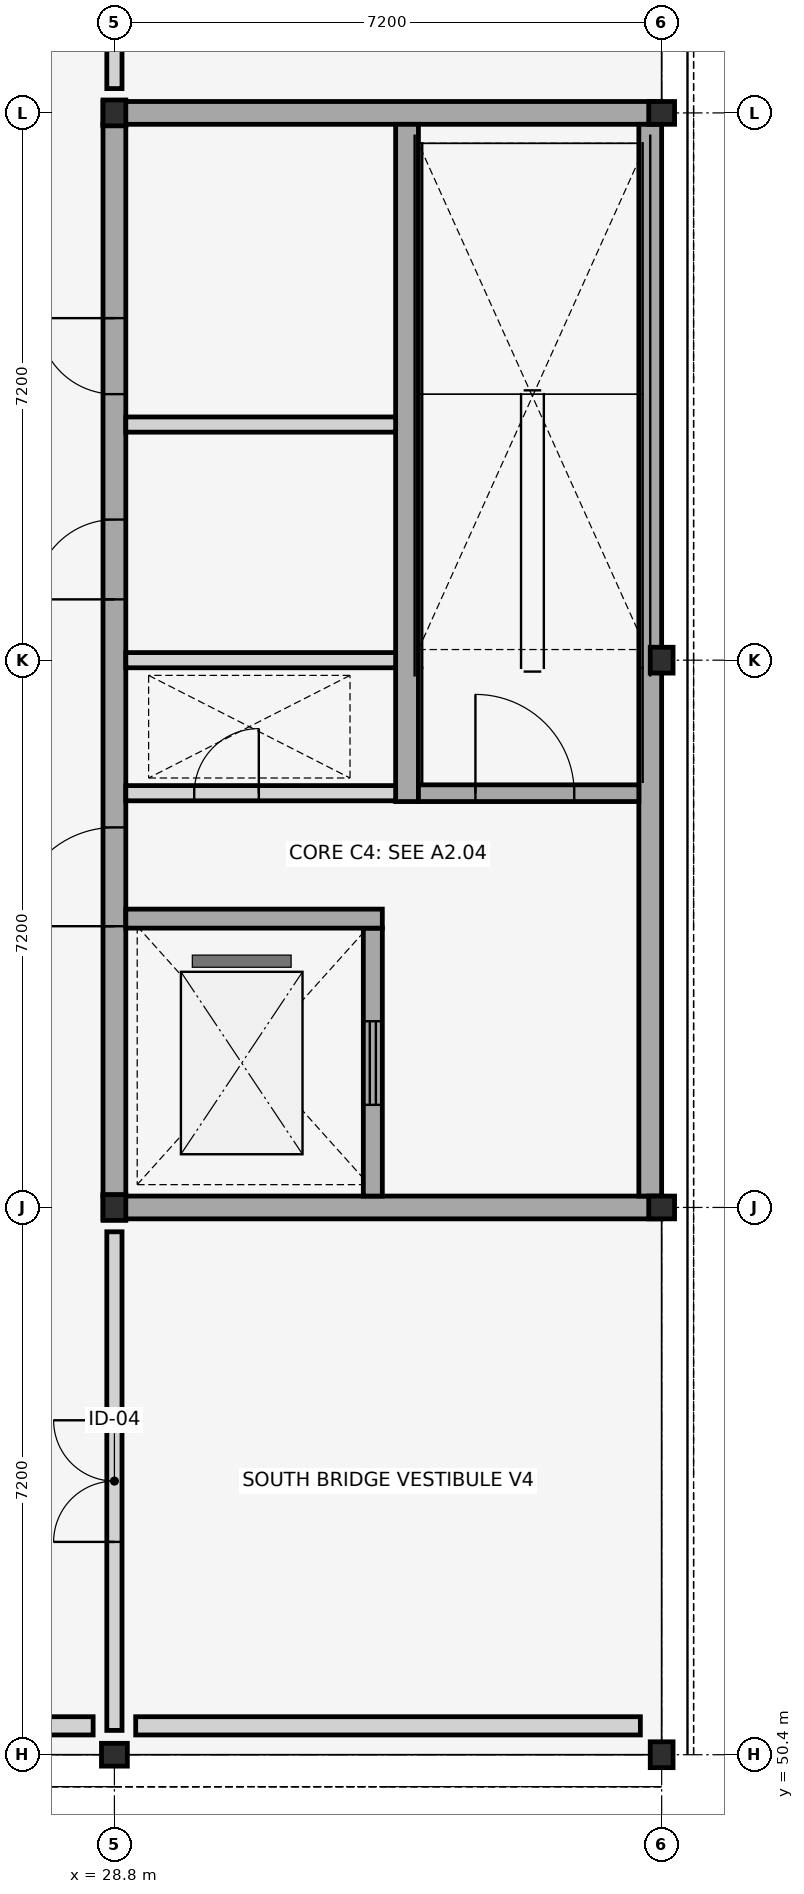
"""IFC4 building model, lengths in metres.
Left out: names, types, materials, properties, quantities, classifications, styles, units other than length and angle.
Written with IfcOpenShell. Run it as: python <this file> out.ifc"""

import sys

from ifc_helpers import new_model, si_unit, direction, frame, frame_2d, origin, origin_2d, place, context, subcontext, project, spatial, rectangle, i_section, extrude, element, fill, save


model = new_model("IFC4")
c1 = context("Model", 3, precision=1e-05, world=origin(), true_north=direction((0.0, 1.0)))
c2 = subcontext(c1, "Body", "Model", "MODEL_VIEW")
j1 = project(units=[si_unit("LENGTHUNIT", "METRE"), si_unit("PLANEANGLEUNIT", "RADIAN")], contexts=[c1])
p1 = place(None, origin())
s1 = spatial("IfcSite", under=j1, at=p1, CompositionType="ELEMENT")
p2 = place(p1, origin())
s2 = spatial("IfcBuilding", under=s1, at=p2, CompositionType="ELEMENT")
p3 = place(p2, frame((0.0, 0.0, 4.5)))
s3 = spatial("IfcBuildingStorey", under=s2, at=p3, CompositionType="ELEMENT", Elevation=4.5)
for number, where, z_axis, x_axis in (
    (1, (28.8, 50.4, 0.0), (0.0, 0.0, 1.0), (0.0, 1.0, 0.0)),
    (2, (28.8, 57.6, 0.0), (0.0, 0.0, 1.0), (1.0, 0.0, 0.0)),
    (3, (28.8, 72.0, 0.0), (0.0, 0.0, 1.0), (1.0, 0.0, 0.0)),
    (4, (36.0, 50.4, 0.0), (0.0, 0.0, 1.0), (1.0, 0.0, 0.0)),
    (5, (36.0, 57.6, 0.0), (0.0, 0.0, 1.0), (0.0, 1.0, 0.0)),
    (6, (36.0, 64.8, 0.0), (0.0, 0.0, 1.0), (1.0, 0.0, 0.0)),
    (7, (36.0, 72.0, 0.0), (0.0, 0.0, 1.0), (0.0, 1.0, 0.0)),
):
    element("IfcColumn", number, at=place(p3, frame(where, z_axis=z_axis, x_axis=x_axis)), inside=s3, PredefinedType="COLUMN", context=c2, shape_type="SweptSolid", body=[
        extrude(i_section(OverallWidth=0.3, OverallDepth=0.34, WebThickness=0.012, FlangeThickness=0.021, FilletRadius=0.027, at=origin_2d()), origin(), (0.0, 0.0, 1.0), 4.2),
    ])
p4 = place(p3, frame((21.88, 50.78, 0.0), z_axis=(0.0, 0.0, 1.0), x_axis=(1.0, 0.0, 0.0)))
e8 = element("IfcWall", 8, at=p4, inside=s3, PredefinedType="STANDARD", context=c2, shape_type="SweptSolid", body=[
    extrude(rectangle(XDim=6.64, YDim=0.24, at=frame_2d((3.32, 0.0))), origin(), (0.0, 0.0, 1.0), 3.58),
])
p5 = place(p3, frame((29.08, 50.78, 0.0), z_axis=(0.0, 0.0, 1.0), x_axis=(1.0, 0.0, 0.0)))
e9 = element("IfcWall", 9, at=p5, inside=s3, PredefinedType="STANDARD", context=c2, shape_type="SweptSolid", body=[
    extrude(rectangle(XDim=6.64, YDim=0.24, at=frame_2d((3.32, 0.0))), origin(), (0.0, 0.0, 1.0), 3.58),
])
for number, where, z_axis, x_axis in (
    (10, (28.65, 57.6, 0.0), (0.0, 0.0, 1.0), (1.0, 0.0, 0.0)),
    (11, (28.65, 72.0, 0.0), (0.0, 0.0, 1.0), (1.0, 0.0, 0.0)),
):
    element("IfcWall", number, at=place(p3, frame(where, z_axis=z_axis, x_axis=x_axis)), inside=s3, PredefinedType="SHEAR", context=c2, shape_type="SweptSolid", body=[
        extrude(rectangle(XDim=7.35, YDim=0.3, at=frame_2d((3.675, 0.0))), origin(), (0.0, 0.0, 1.0), 3.98),
    ])
p6 = place(p3, frame((35.85, 57.75, 0.0), z_axis=(0.0, 0.0, 1.0), x_axis=(0.0, 1.0, 0.0)))
e12 = element("IfcWall", 12, at=p6, inside=s3, PredefinedType="SHEAR", context=c2, shape_type="SweptSolid", body=[
    extrude(rectangle(XDim=14.1, YDim=0.3, at=frame_2d((7.05, 0.0))), origin(), (0.0, 0.0, 1.0), 3.98),
])
p7 = place(p3, frame((28.8, 57.75, 0.0), z_axis=(0.0, 0.0, 1.0), x_axis=(0.0, 1.0, 0.0)))
e13 = element("IfcWall", 13, at=p7, inside=s3, PredefinedType="SHEAR", context=c2, shape_type="SweptSolid", body=[
    extrude(rectangle(XDim=14.1, YDim=0.3, at=frame_2d((7.05, 0.0))), origin(), (0.0, 0.0, 1.0), 3.98),
])
p8 = place(p7, frame((3.55, 0.0, 0.0)))
e14 = element("IfcOpeningElement", 14, at=p8, cuts=e13, PredefinedType="OPENING", context=c2, shape_type="SweptSolid", body=[
    extrude(rectangle(XDim=1.3, YDim=2.2, at=frame_2d((0.65, 1.1))), frame((0.0, 0.16, 0.0), z_axis=(0.0, -1.0, 0.0), x_axis=(1.0, 0.0, 0.0)), (0.0, 0.0, 1.0), 0.32),
])
p9 = place(p7, frame((7.85, 0.0, 0.0)))
e15 = element("IfcOpeningElement", 15, at=p9, cuts=e13, PredefinedType="OPENING", context=c2, shape_type="SweptSolid", body=[
    extrude(rectangle(XDim=1.05, YDim=2.15, at=frame_2d((0.525, 1.075))), frame((0.0, 0.16, 0.0), z_axis=(0.0, -1.0, 0.0), x_axis=(1.0, 0.0, 0.0)), (0.0, 0.0, 1.0), 0.32),
])
p10 = place(p7, frame((10.55, 0.0, 0.0)))
e16 = element("IfcOpeningElement", 16, at=p10, cuts=e13, PredefinedType="OPENING", context=c2, shape_type="SweptSolid", body=[
    extrude(rectangle(XDim=1.0, YDim=2.15, at=frame_2d((0.5, 1.075))), frame((0.0, 0.16, 0.0), z_axis=(0.0, -1.0, 0.0), x_axis=(1.0, 0.0, 0.0)), (0.0, 0.0, 1.0), 0.32),
])
p11 = place(p3, frame((32.2, 57.75, 0.0), z_axis=(0.0, 0.0, 1.0), x_axis=(0.0, 1.0, 0.0)))
e17 = element("IfcWall", 17, at=p11, inside=s3, PredefinedType="SHEAR", context=c2, shape_type="SweptSolid", body=[
    extrude(rectangle(XDim=3.525, YDim=0.25, at=frame_2d((1.762, 0.0))), origin(), (0.0, 0.0, 1.0), 3.98),
])
p12 = place(p11, frame((1.2, 0.0, 0.0)))
e18 = element("IfcOpeningElement", 18, at=p12, cuts=e17, PredefinedType="OPENING", context=c2, shape_type="SweptSolid", body=[
    extrude(rectangle(XDim=1.1, YDim=2.15, at=frame_2d((0.55, 1.075))), frame((0.0, 0.135, 0.0), z_axis=(0.0, -1.0, 0.0), x_axis=(1.0, 0.0, 0.0)), (0.0, 0.0, 1.0), 0.27),
])
p13 = place(p3, frame((32.65, 62.94, 0.0), z_axis=(0.0, 0.0, 1.0), x_axis=(0.0, 1.0, 0.0)))
e19 = element("IfcWall", 19, at=p13, inside=s3, PredefinedType="SHEAR", context=c2, shape_type="SweptSolid", body=[
    extrude(rectangle(XDim=8.91, YDim=0.3, at=frame_2d((4.455, 0.0))), origin(), (0.0, 0.0, 1.0), 3.98),
])
p14 = place(p3, frame((28.95, 63.05, 0.0), z_axis=(0.0, 0.0, 1.0), x_axis=(1.0, 0.0, 0.0)))
e20 = element("IfcWall", 20, at=p14, inside=s3, PredefinedType="PLUMBINGWALL", context=c2, shape_type="SweptSolid", body=[
    extrude(rectangle(XDim=3.55, YDim=0.2, at=frame_2d((1.775, 0.0))), origin(), (0.0, 0.0, 1.0), 3.4),
])
p15 = place(p14, frame((0.9, 0.0, 0.0)))
e21 = element("IfcOpeningElement", 21, at=p15, cuts=e20, PredefinedType="OPENING", context=c2, shape_type="SweptSolid", body=[
    extrude(rectangle(XDim=0.85, YDim=2.05, at=frame_2d((0.425, 1.025))), frame((0.0, 0.11, 0.0), z_axis=(0.0, -1.0, 0.0), x_axis=(1.0, 0.0, 0.0)), (0.0, 0.0, 1.0), 0.22),
])
p16 = place(p3, frame((32.8, 63.05, 0.0), z_axis=(0.0, 0.0, 1.0), x_axis=(1.0, 0.0, 0.0)))
e22 = element("IfcWall", 22, at=p16, inside=s3, PredefinedType="SHEAR", context=c2, shape_type="SweptSolid", body=[
    extrude(rectangle(XDim=2.9, YDim=0.22, at=frame_2d((1.45, 0.0))), origin(), (0.0, 0.0, 1.0), 3.98),
])
p17 = place(p16, frame((0.75, 0.0, 0.0)))
e23 = element("IfcOpeningElement", 23, at=p17, cuts=e22, PredefinedType="OPENING", context=c2, shape_type="SweptSolid", body=[
    extrude(rectangle(XDim=1.3, YDim=2.2, at=frame_2d((0.65, 1.1))), frame((0.0, 0.12, 0.0), z_axis=(0.0, -1.0, 0.0), x_axis=(1.0, 0.0, 0.0)), (0.0, 0.0, 1.0), 0.24),
])
p18 = place(p3, frame((28.95, 61.4, 0.0), z_axis=(0.0, 0.0, 1.0), x_axis=(1.0, 0.0, 0.0)))
e24 = element("IfcWall", 24, at=p18, inside=s3, PredefinedType="SHEAR", context=c2, shape_type="SweptSolid", body=[
    extrude(rectangle(XDim=3.375, YDim=0.25, at=frame_2d((1.688, 0.0))), origin(), (0.0, 0.0, 1.0), 3.98),
])
for number, where, z_axis, x_axis in (
    (25, (28.95, 64.8, 0.0), (0.0, 0.0, 1.0), (1.0, 0.0, 0.0)),
    (26, (28.95, 67.9, 0.0), (0.0, 0.0, 1.0), (1.0, 0.0, 0.0)),
):
    element("IfcWall", number, at=place(p3, frame(where, z_axis=z_axis, x_axis=x_axis)), inside=s3, PredefinedType="PLUMBINGWALL", context=c2, shape_type="SweptSolid", body=[
        extrude(rectangle(XDim=3.55, YDim=0.2, at=frame_2d((1.775, 0.0))), origin(), (0.0, 0.0, 1.0), 3.4),
    ])
p19 = place(p3, frame((28.8, 72.32, 0.0), z_axis=(0.0, 0.0, 1.0), x_axis=(0.0, 1.0, 0.0)))
e27 = element("IfcWall", 27, at=p19, inside=s3, PredefinedType="PARTITIONING", context=c2, shape_type="SweptSolid", body=[
    extrude(rectangle(XDim=20.96, YDim=0.2, at=frame_2d((10.48, 0.0))), origin(), (0.0, 0.0, 1.0), 3.15),
])
p20 = place(p19, frame((9.68, 0.0, 0.0)))
e28 = element("IfcOpeningElement", 28, at=p20, cuts=e27, PredefinedType="OPENING", context=c2, shape_type="SweptSolid", body=[
    extrude(rectangle(XDim=1.6, YDim=2.35, at=frame_2d((0.8, 1.175))), frame((0.0, 0.11, 0.0), z_axis=(0.0, -1.0, 0.0), x_axis=(1.0, 0.0, 0.0)), (0.0, 0.0, 1.0), 0.22),
])
p21 = place(p3, frame((28.8, 50.72, 0.0), z_axis=(0.0, 0.0, 1.0), x_axis=(0.0, 1.0, 0.0)))
e29 = element("IfcWall", 29, at=p21, inside=s3, PredefinedType="PARTITIONING", context=c2, shape_type="SweptSolid", body=[
    extrude(rectangle(XDim=6.56, YDim=0.2, at=frame_2d((3.28, 0.0))), origin(), (0.0, 0.0, 1.0), 3.15),
])
p22 = place(p21, frame((2.48, 0.0, 0.0)))
e30 = element("IfcOpeningElement", 30, at=p22, cuts=e29, PredefinedType="OPENING", context=c2, shape_type="SweptSolid", body=[
    extrude(rectangle(XDim=1.6, YDim=2.35, at=frame_2d((0.8, 1.175))), frame((0.0, 0.11, 0.0), z_axis=(0.0, -1.0, 0.0), x_axis=(1.0, 0.0, 0.0)), (0.0, 0.0, 1.0), 0.22),
])
p23 = place(p8, origin())
e31 = element("IfcDoor", 31, at=p23, inside=s3, OperationType="SINGLE_SWING_LEFT", PredefinedType="DOOR", context=c2, shape_type="SweptSolid", body=[
    extrude(rectangle(XDim=1.3, YDim=2.2, at=frame_2d((0.65, 1.1))), frame((0.0, 0.025, 0.0), z_axis=(0.0, -1.0, 0.0), x_axis=(1.0, 0.0, 0.0)), (0.0, 0.0, 1.0), 0.05),
])
fill(e14, e31)
p24 = place(p9, origin())
e32 = element("IfcDoor", 32, at=p24, inside=s3, OperationType="SINGLE_SWING_LEFT", PredefinedType="DOOR", context=c2, shape_type="SweptSolid", body=[
    extrude(rectangle(XDim=1.05, YDim=2.15, at=frame_2d((0.525, 1.075))), frame((0.0, 0.025, 0.0), z_axis=(0.0, -1.0, 0.0), x_axis=(1.0, 0.0, 0.0)), (0.0, 0.0, 1.0), 0.05),
])
fill(e15, e32)
p25 = place(p10, origin())
e33 = element("IfcDoor", 33, at=p25, inside=s3, OperationType="SINGLE_SWING_RIGHT", PredefinedType="DOOR", context=c2, shape_type="SweptSolid", body=[
    extrude(rectangle(XDim=1.0, YDim=2.15, at=frame_2d((0.5, 1.075))), frame((0.0, 0.025, 0.0), z_axis=(0.0, -1.0, 0.0), x_axis=(1.0, 0.0, 0.0)), (0.0, 0.0, 1.0), 0.05),
])
fill(e16, e33)
p26 = place(p12, origin())
e34 = element("IfcDoor", 34, at=p26, inside=s3, OperationType="SLIDING_TO_LEFT", PredefinedType="DOOR", context=c2, shape_type="SweptSolid", body=[
    extrude(rectangle(XDim=1.1, YDim=2.15, at=frame_2d((0.55, 1.075))), frame((0.0, 0.025, 0.0), z_axis=(0.0, -1.0, 0.0), x_axis=(1.0, 0.0, 0.0)), (0.0, 0.0, 1.0), 0.05),
])
fill(e18, e34)
p27 = place(p15, origin())
e35 = element("IfcDoor", 35, at=p27, inside=s3, OperationType="SINGLE_SWING_RIGHT", PredefinedType="TRAPDOOR", context=c2, shape_type="SweptSolid", body=[
    extrude(rectangle(XDim=0.85, YDim=2.05, at=frame_2d((0.425, 1.025))), frame((0.0, 0.025, 0.0), z_axis=(0.0, -1.0, 0.0), x_axis=(1.0, 0.0, 0.0)), (0.0, 0.0, 1.0), 0.05),
])
fill(e21, e35)
p28 = place(p17, origin())
e36 = element("IfcDoor", 36, at=p28, inside=s3, OperationType="SINGLE_SWING_LEFT", PredefinedType="DOOR", context=c2, shape_type="SweptSolid", body=[
    extrude(rectangle(XDim=1.3, YDim=2.2, at=frame_2d((0.65, 1.1))), frame((0.0, 0.025, 0.0), z_axis=(0.0, -1.0, 0.0), x_axis=(1.0, 0.0, 0.0)), (0.0, 0.0, 1.0), 0.05),
])
fill(e23, e36)
p29 = place(p22, origin())
e37 = element("IfcDoor", 37, at=p29, inside=s3, OperationType="DOUBLE_DOOR_SINGLE_SWING", PredefinedType="DOOR", context=c2, shape_type="SweptSolid", body=[
    extrude(rectangle(XDim=1.6, YDim=2.35, at=frame_2d((0.8, 1.175))), frame((0.0, 0.025, 0.0), z_axis=(0.0, -1.0, 0.0), x_axis=(1.0, 0.0, 0.0)), (0.0, 0.0, 1.0), 0.05),
])
fill(e30, e37)
save(model, sys.argv[1])
